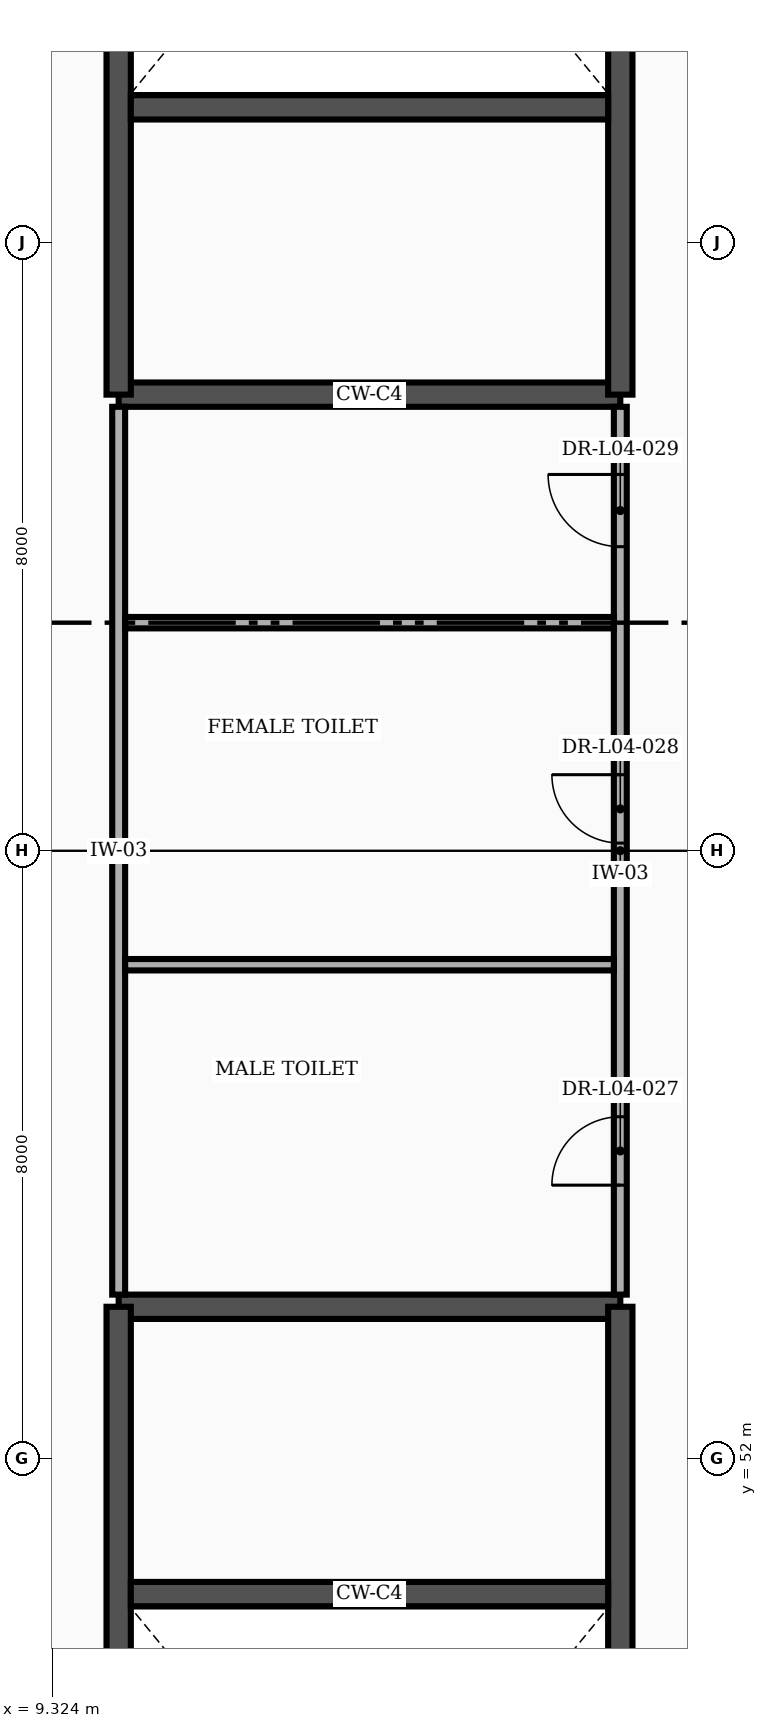
"""IFC4 building model, lengths in metres.
Left out: names, types, materials, properties, quantities, classifications, styles, units other than length and angle.
Written with IfcOpenShell. Run it as: python <this file> out.ifc"""

import sys

from ifc_helpers import new_model, si_unit, direction, frame, frame_2d, origin, place, context, subcontext, project, spatial, rectangle, extrude, element, fill, save


model = new_model("IFC4")
c1 = context("Model", 3, precision=1e-05, world=origin(), true_north=direction((0.0, 1.0)))
c2 = subcontext(c1, "Body", "Model", "MODEL_VIEW")
j1 = project(units=[si_unit("LENGTHUNIT", "METRE"), si_unit("PLANEANGLEUNIT", "RADIAN")], contexts=[c1])
p1 = place(None, origin())
s1 = spatial("IfcSite", under=j1, at=p1, CompositionType="ELEMENT")
p2 = place(p1, origin())
s2 = spatial("IfcBuilding", under=s1, at=p2, CompositionType="ELEMENT")
p3 = place(p2, frame((0.0, 0.0, 21.6)))
s3 = spatial("IfcBuildingStorey", under=s2, at=p3, CompositionType="ELEMENT", Elevation=21.6)
p4 = place(p3, frame((10.2, 54.0, 0.0), z_axis=(0.0, 0.0, 1.0), x_axis=(1.0, 0.0, 0.0)))
e1 = element("IfcWall", 1, at=p4, inside=s3, PredefinedType="SHEAR", context=c2, shape_type="SweptSolid", body=[
    extrude(rectangle(XDim=6.6, YDim=0.32, at=frame_2d((3.3, 0.0))), origin(), (0.0, 0.0, 1.0), 3.585),
])
p5 = place(p3, frame((10.2, 39.4, 0.0), z_axis=(0.0, 0.0, 1.0), x_axis=(0.0, 1.0, 0.0)))
e2 = element("IfcWall", 2, at=p5, inside=s3, PredefinedType="SHEAR", context=c2, shape_type="SweptSolid", body=[
    extrude(rectangle(XDim=14.6, YDim=0.32, at=frame_2d((7.3, 0.0))), origin(), (0.0, 0.0, 1.0), 3.585),
])
p6 = place(p3, frame((16.8, 39.4, 0.0), z_axis=(0.0, 0.0, 1.0), x_axis=(0.0, 1.0, 0.0)))
e3 = element("IfcWall", 3, at=p6, inside=s3, PredefinedType="SHEAR", context=c2, shape_type="SweptSolid", body=[
    extrude(rectangle(XDim=14.6, YDim=0.32, at=frame_2d((7.3, 0.0))), origin(), (0.0, 0.0, 1.0), 3.585),
])
p7 = place(p6, frame((0.55, 0.0, 0.0)))
e4 = element("IfcOpeningElement", 4, at=p7, cuts=e3, PredefinedType="OPENING", context=c2, shape_type="SweptSolid", body=[
    extrude(rectangle(XDim=2.4, YDim=2.25, at=frame_2d((1.2, 1.125))), frame((0.0, 0.172, 0.0), z_axis=(0.0, -1.0, 0.0), x_axis=(1.0, 0.0, 0.0)), (0.0, 0.0, 1.0), 0.344),
])
p8 = place(p3, frame((10.36, 50.22, 0.0), z_axis=(0.0, 0.0, 1.0), x_axis=(1.0, 0.0, 0.0)))
e5 = element("IfcWall", 5, at=p8, inside=s3, PredefinedType="SHEAR", context=c2, shape_type="SweptSolid", body=[
    extrude(rectangle(XDim=6.28, YDim=0.32, at=frame_2d((3.14, 0.0))), origin(), (0.0, 0.0, 1.0), 3.585),
])
p9 = place(p3, frame((10.2, 66.0, 0.0), z_axis=(0.0, 0.0, 1.0), x_axis=(1.0, 0.0, 0.0)))
e6 = element("IfcWall", 6, at=p9, inside=s3, PredefinedType="SHEAR", context=c2, shape_type="SweptSolid", body=[
    extrude(rectangle(XDim=6.6, YDim=0.32, at=frame_2d((3.3, 0.0))), origin(), (0.0, 0.0, 1.0), 3.585),
])
p10 = place(p3, frame((10.2, 66.0, 0.0), z_axis=(0.0, 0.0, 1.0), x_axis=(0.0, 1.0, 0.0)))
e7 = element("IfcWall", 7, at=p10, inside=s3, PredefinedType="SHEAR", context=c2, shape_type="SweptSolid", body=[
    extrude(rectangle(XDim=14.6, YDim=0.32, at=frame_2d((7.3, 0.0))), origin(), (0.0, 0.0, 1.0), 3.585),
])
p11 = place(p3, frame((16.8, 66.0, 0.0), z_axis=(0.0, 0.0, 1.0), x_axis=(0.0, 1.0, 0.0)))
e8 = element("IfcWall", 8, at=p11, inside=s3, PredefinedType="SHEAR", context=c2, shape_type="SweptSolid", body=[
    extrude(rectangle(XDim=14.6, YDim=0.32, at=frame_2d((7.3, 0.0))), origin(), (0.0, 0.0, 1.0), 3.585),
])
p12 = place(p11, frame((11.65, 0.0, 0.0)))
e9 = element("IfcOpeningElement", 9, at=p12, cuts=e8, PredefinedType="OPENING", context=c2, shape_type="SweptSolid", body=[
    extrude(rectangle(XDim=2.4, YDim=2.25, at=frame_2d((1.2, 1.125))), frame((0.0, 0.172, 0.0), z_axis=(0.0, -1.0, 0.0), x_axis=(1.0, 0.0, 0.0)), (0.0, 0.0, 1.0), 0.344),
])
p13 = place(p3, frame((10.36, 69.78, 0.0), z_axis=(0.0, 0.0, 1.0), x_axis=(1.0, 0.0, 0.0)))
e10 = element("IfcWall", 10, at=p13, inside=s3, PredefinedType="SHEAR", context=c2, shape_type="SweptSolid", body=[
    extrude(rectangle(XDim=6.28, YDim=0.32, at=frame_2d((3.14, 0.0))), origin(), (0.0, 0.0, 1.0), 3.585),
])
p14 = place(p3, frame((10.2, 54.16, 0.0), z_axis=(0.0, 0.0, 1.0), x_axis=(0.0, 1.0, 0.0)))
e11 = element("IfcWall", 11, at=p14, inside=s3, PredefinedType="PARTITIONING", context=c2, shape_type="SweptSolid", body=[
    extrude(rectangle(XDim=11.68, YDim=0.17, at=frame_2d((5.84, 0.0))), origin(), (0.0, 0.0, 1.0), 3.585),
])
p15 = place(p3, frame((16.8, 54.16, 0.0), z_axis=(0.0, 0.0, 1.0), x_axis=(0.0, 1.0, 0.0)))
e12 = element("IfcWall", 12, at=p15, inside=s3, PredefinedType="PARTITIONING", context=c2, shape_type="SweptSolid", body=[
    extrude(rectangle(XDim=11.68, YDim=0.17, at=frame_2d((5.84, 0.0))), origin(), (0.0, 0.0, 1.0), 3.585),
])
p16 = place(p15, frame((1.44, 0.0, 0.0)))
e13 = element("IfcOpeningElement", 13, at=p16, cuts=e12, PredefinedType="OPENING", context=c2, shape_type="SweptSolid", body=[
    extrude(rectangle(XDim=0.9, YDim=2.1, at=frame_2d((0.45, 1.05))), frame((0.0, 0.097, 0.0), z_axis=(0.0, -1.0, 0.0), x_axis=(1.0, 0.0, 0.0)), (0.0, 0.0, 1.0), 0.194),
])
p17 = place(p15, frame((5.94, 0.0, 0.0)))
e14 = element("IfcOpeningElement", 14, at=p17, cuts=e12, PredefinedType="OPENING", context=c2, shape_type="SweptSolid", body=[
    extrude(rectangle(XDim=0.9, YDim=2.1, at=frame_2d((0.45, 1.05))), frame((0.0, 0.097, 0.0), z_axis=(0.0, -1.0, 0.0), x_axis=(1.0, 0.0, 0.0)), (0.0, 0.0, 1.0), 0.194),
])
p18 = place(p15, frame((9.84, 0.0, 0.0)))
e15 = element("IfcOpeningElement", 15, at=p18, cuts=e12, PredefinedType="OPENING", context=c2, shape_type="SweptSolid", body=[
    extrude(rectangle(XDim=0.95, YDim=2.1, at=frame_2d((0.475, 1.05))), frame((0.0, 0.097, 0.0), z_axis=(0.0, -1.0, 0.0), x_axis=(1.0, 0.0, 0.0)), (0.0, 0.0, 1.0), 0.194),
])
for number, where, z_axis, x_axis in (
    (16, (10.285, 58.5, 0.0), (0.0, 0.0, 1.0), (1.0, 0.0, 0.0)),
    (17, (10.285, 63.0, 0.0), (0.0, 0.0, 1.0), (1.0, 0.0, 0.0)),
):
    element("IfcWall", number, at=place(p3, frame(where, z_axis=z_axis, x_axis=x_axis)), inside=s3, PredefinedType="PARTITIONING", context=c2, shape_type="SweptSolid", body=[
        extrude(rectangle(XDim=6.43, YDim=0.15, at=frame_2d((3.215, 0.0))), origin(), (0.0, 0.0, 1.0), 3.585),
    ])
p19 = place(p16, origin())
e18 = element("IfcDoor", 18, at=p19, inside=s3, OperationType="SINGLE_SWING_LEFT", PredefinedType="DOOR", context=c2, shape_type="SweptSolid", body=[
    extrude(rectangle(XDim=0.9, YDim=2.1, at=frame_2d((0.45, 1.05))), frame((0.0, 0.025, 0.0), z_axis=(0.0, -1.0, 0.0), x_axis=(1.0, 0.0, 0.0)), (0.0, 0.0, 1.0), 0.05),
])
fill(e13, e18)
p20 = place(p17, origin())
e19 = element("IfcDoor", 19, at=p20, inside=s3, OperationType="SINGLE_SWING_RIGHT", PredefinedType="DOOR", context=c2, shape_type="SweptSolid", body=[
    extrude(rectangle(XDim=0.9, YDim=2.1, at=frame_2d((0.45, 1.05))), frame((0.0, 0.025, 0.0), z_axis=(0.0, -1.0, 0.0), x_axis=(1.0, 0.0, 0.0)), (0.0, 0.0, 1.0), 0.05),
])
fill(e14, e19)
p21 = place(p18, origin())
e20 = element("IfcDoor", 20, at=p21, inside=s3, OperationType="SINGLE_SWING_RIGHT", PredefinedType="DOOR", context=c2, shape_type="SweptSolid", body=[
    extrude(rectangle(XDim=0.95, YDim=2.1, at=frame_2d((0.475, 1.05))), frame((0.0, 0.025, 0.0), z_axis=(0.0, -1.0, 0.0), x_axis=(1.0, 0.0, 0.0)), (0.0, 0.0, 1.0), 0.05),
])
fill(e15, e20)
save(model, sys.argv[1])
